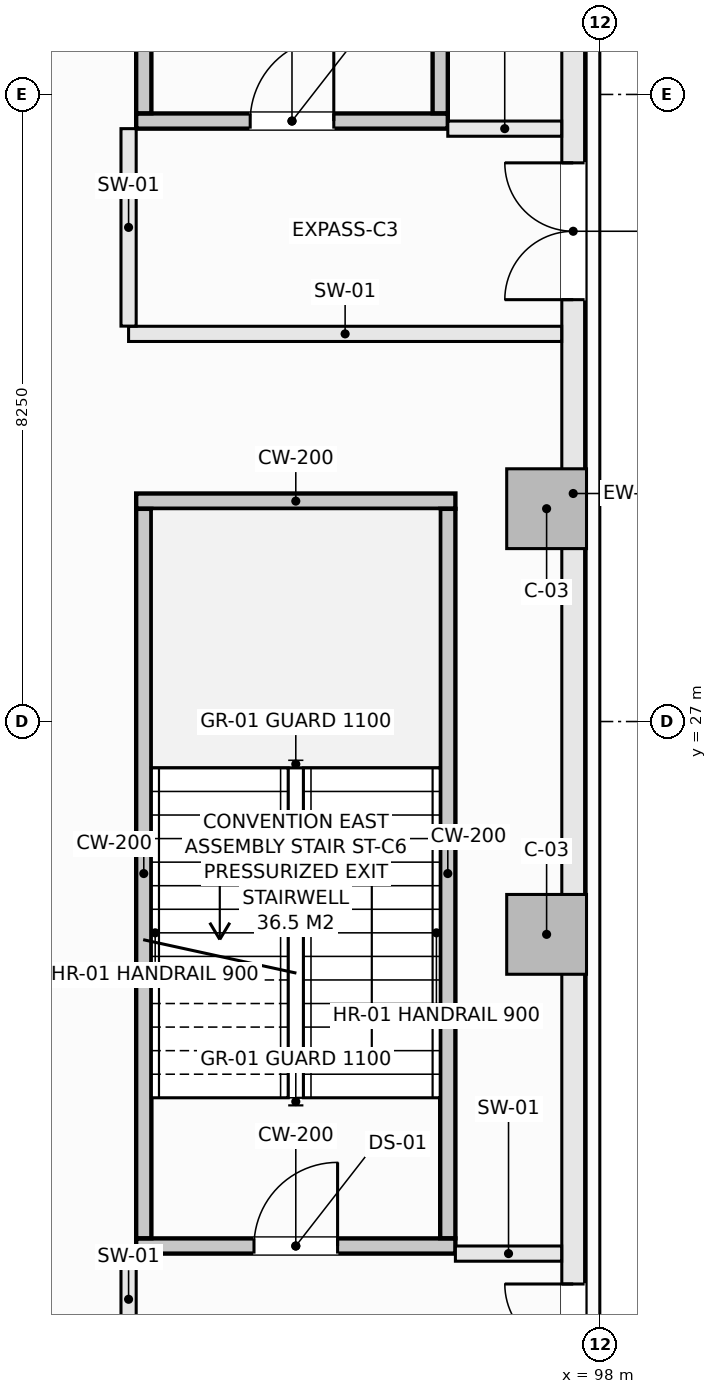
"""IFC4 building model, lengths in metres.
Left out: names, types, materials, properties, quantities, classifications, styles, units other than length and angle.
Written with IfcOpenShell. Run it as: python <this file> out.ifc"""

import sys

from ifc_helpers import new_model, si_unit, direction, frame, frame_2d, origin, origin_2d, place, context, subcontext, project, spatial, rectangle, extrude, element, fill, save


model = new_model("IFC4")
c1 = context("Model", 3, precision=1e-05, world=origin(), true_north=direction((0.0, 1.0)))
c2 = subcontext(c1, "Body", "Model", "MODEL_VIEW")
j1 = project(units=[si_unit("LENGTHUNIT", "METRE"), si_unit("PLANEANGLEUNIT", "RADIAN")], contexts=[c1])
p1 = place(None, origin())
s1 = spatial("IfcSite", under=j1, at=p1, CompositionType="ELEMENT")
p2 = place(p1, origin())
s2 = spatial("IfcBuilding", under=s1, at=p2, CompositionType="ELEMENT")
p3 = place(p2, origin())
s3 = spatial("IfcBuildingStorey", under=s2, at=p3, CompositionType="ELEMENT", Elevation=0.0)
for number, where, z_axis, x_axis in (
    (1, (97.3, 24.2, -0.36), (0.0, 0.0, 1.0), (1.0, 0.0, 0.0)),
    (2, (97.3, 29.8, -0.36), (0.0, 0.0, 1.0), (1.0, 0.0, 0.0)),
):
    element("IfcColumn", number, at=place(p3, frame(where, z_axis=z_axis, x_axis=x_axis)), inside=s3, PredefinedType="COLUMN", context=c2, shape_type="SweptSolid", body=[
        extrude(rectangle(XDim=1.05, YDim=1.05, at=origin_2d()), origin(), (0.0, 0.0, 1.0), 5.1),
    ])
p4 = place(p3, frame((97.65, 2.35, 0.0), z_axis=(0.0, 0.0, 1.0), x_axis=(0.0, 1.0, 0.0)))
e3 = element("IfcWall", 3, at=p4, inside=s3, PredefinedType="SOLIDWALL", context=c2, shape_type="SweptSolid", body=[
    extrude(rectangle(XDim=49.3, YDim=0.3, at=frame_2d((24.65, 0.0))), origin(), (0.0, 0.0, 1.0), 4.74),
])
p5 = place(p4, frame((15.45, 0.0, 0.0)))
e4 = element("IfcOpeningElement", 4, at=p5, cuts=e3, PredefinedType="OPENING", context=c2, shape_type="SweptSolid", body=[
    extrude(rectangle(XDim=1.8, YDim=2.3, at=frame_2d((0.9, 1.15))), frame((0.0, 0.16, 0.0), z_axis=(0.0, -1.0, 0.0), x_axis=(1.0, 0.0, 0.0)), (0.0, 0.0, 1.0), 0.32),
])
p6 = place(p4, frame((30.2, 0.0, 0.0)))
e5 = element("IfcOpeningElement", 5, at=p6, cuts=e3, PredefinedType="OPENING", context=c2, shape_type="SweptSolid", body=[
    extrude(rectangle(XDim=1.8, YDim=2.3, at=frame_2d((0.9, 1.15))), frame((0.0, 0.16, 0.0), z_axis=(0.0, -1.0, 0.0), x_axis=(1.0, 0.0, 0.0)), (0.0, 0.0, 1.0), 0.32),
])
p7 = place(p3, frame((91.9, 34.9, -0.36), z_axis=(0.0, 0.0, 1.0), x_axis=(1.0, 0.0, 0.0)))
e6 = element("IfcWall", 6, at=p7, inside=s3, PredefinedType="SHEAR", context=c2, shape_type="SweptSolid", body=[
    extrude(rectangle(XDim=4.1, YDim=0.2, at=frame_2d((2.05, 0.0))), origin(), (0.0, 0.0, 1.0), 5.1),
])
p8 = place(p7, frame((1.5, 0.0, 0.36)))
e7 = element("IfcOpeningElement", 7, at=p8, cuts=e6, PredefinedType="OPENING", context=c2, shape_type="SweptSolid", body=[
    extrude(rectangle(XDim=1.1, YDim=2.15, at=frame_2d((0.55, 1.075))), frame((0.0, 0.11, 0.0), z_axis=(0.0, -1.0, 0.0), x_axis=(1.0, 0.0, 0.0)), (0.0, 0.0, 1.0), 0.22),
])
for number, where, z_axis, x_axis in (
    (8, (92.0, 35.002, -0.36), (0.0, 0.0, 1.0), (0.0, 1.0, 0.0)),
    (9, (95.9, 35.002, -0.36), (0.0, 0.0, 1.0), (0.0, 1.0, 0.0)),
):
    element("IfcWall", number, at=place(p3, frame(where, z_axis=z_axis, x_axis=x_axis)), inside=s3, PredefinedType="SHEAR", context=c2, shape_type="SweptSolid", body=[
        extrude(rectangle(XDim=9.596, YDim=0.2, at=frame_2d((4.798, 0.0))), origin(), (0.0, 0.0, 1.0), 5.1),
    ])
p9 = place(p3, frame((91.9, 20.1, -0.36), z_axis=(0.0, 0.0, 1.0), x_axis=(1.0, 0.0, 0.0)))
e10 = element("IfcWall", 10, at=p9, inside=s3, PredefinedType="SHEAR", context=c2, shape_type="SweptSolid", body=[
    extrude(rectangle(XDim=4.2, YDim=0.2, at=frame_2d((2.1, 0.0))), origin(), (0.0, 0.0, 1.0), 5.1),
])
p10 = place(p9, frame((1.55, 0.0, 0.36)))
e11 = element("IfcOpeningElement", 11, at=p10, cuts=e10, PredefinedType="OPENING", context=c2, shape_type="SweptSolid", body=[
    extrude(rectangle(XDim=1.1, YDim=2.15, at=frame_2d((0.55, 1.075))), frame((0.0, 0.11, 0.0), z_axis=(0.0, -1.0, 0.0), x_axis=(1.0, 0.0, 0.0)), (0.0, 0.0, 1.0), 0.22),
])
p11 = place(p3, frame((91.9, 29.9, -0.36), z_axis=(0.0, 0.0, 1.0), x_axis=(1.0, 0.0, 0.0)))
e12 = element("IfcWall", 12, at=p11, inside=s3, PredefinedType="SHEAR", context=c2, shape_type="SweptSolid", body=[
    extrude(rectangle(XDim=4.2, YDim=0.2, at=frame_2d((2.1, 0.0))), origin(), (0.0, 0.0, 1.0), 5.1),
])
for number, where, z_axis, x_axis in (
    (13, (92.0, 20.202, -0.36), (0.0, 0.0, 1.0), (0.0, 1.0, 0.0)),
    (14, (96.0, 20.202, -0.36), (0.0, 0.0, 1.0), (0.0, 1.0, 0.0)),
):
    element("IfcWall", number, at=place(p3, frame(where, z_axis=z_axis, x_axis=x_axis)), inside=s3, PredefinedType="SHEAR", context=c2, shape_type="SweptSolid", body=[
        extrude(rectangle(XDim=9.596, YDim=0.2, at=frame_2d((4.798, 0.0))), origin(), (0.0, 0.0, 1.0), 5.1),
    ])
p12 = place(p3, frame((91.8, 32.1, 0.0), z_axis=(0.0, 0.0, 1.0), x_axis=(1.0, 0.0, 0.0)))
e15 = element("IfcWall", 15, at=p12, inside=s3, PredefinedType="SOLIDWALL", context=c2, shape_type="SweptSolid", body=[
    extrude(rectangle(XDim=5.698, YDim=0.2, at=frame_2d((2.849, 0.0))), origin(), (0.0, 0.0, 1.0), 4.74),
])
p13 = place(p3, frame((96.0, 34.8, 0.0), z_axis=(0.0, 0.0, 1.0), x_axis=(1.0, 0.0, 0.0)))
e16 = element("IfcWall", 16, at=p13, inside=s3, PredefinedType="SOLIDWALL", context=c2, shape_type="SweptSolid", body=[
    extrude(rectangle(XDim=1.498, YDim=0.2, at=frame_2d((0.749, 0.0))), origin(), (0.0, 0.0, 1.0), 4.375),
])
p14 = place(p3, frame((91.8, 18.798, 0.0), z_axis=(0.0, 0.0, 1.0), x_axis=(0.0, 1.0, 0.0)))
e17 = element("IfcWall", 17, at=p14, inside=s3, PredefinedType="SOLIDWALL", context=c2, shape_type="SweptSolid", body=[
    extrude(rectangle(XDim=1.202, YDim=0.2, at=frame_2d((0.601, 0.0))), origin(), (0.0, 0.0, 1.0), 4.74),
])
p15 = place(p3, frame((91.8, 32.202, 0.0), z_axis=(0.0, 0.0, 1.0), x_axis=(0.0, 1.0, 0.0)))
e18 = element("IfcWall", 18, at=p15, inside=s3, PredefinedType="SOLIDWALL", context=c2, shape_type="SweptSolid", body=[
    extrude(rectangle(XDim=2.598, YDim=0.2, at=frame_2d((1.299, 0.0))), origin(), (0.0, 0.0, 1.0), 4.74),
])
p16 = place(p3, frame((96.1, 20.0, 0.0), z_axis=(0.0, 0.0, 1.0), x_axis=(1.0, 0.0, 0.0)))
e19 = element("IfcWall", 19, at=p16, inside=s3, PredefinedType="SOLIDWALL", context=c2, shape_type="SweptSolid", body=[
    extrude(rectangle(XDim=1.398, YDim=0.2, at=frame_2d((0.699, 0.0))), origin(), (0.0, 0.0, 1.0), 4.74),
])
p17 = place(p5, frame((1.8, 0.0, 0.0), z_axis=(0.0, 0.0, 1.0), x_axis=(-1.0, 0.0, 0.0)))
e20 = element("IfcDoor", 20, at=p17, inside=s3, OperationType="DOUBLE_DOOR_SINGLE_SWING", PredefinedType="DOOR", context=c2, shape_type="SweptSolid", body=[
    extrude(rectangle(XDim=1.8, YDim=2.3, at=frame_2d((0.9, 1.15))), frame((0.0, 0.025, 0.0), z_axis=(0.0, -1.0, 0.0), x_axis=(1.0, 0.0, 0.0)), (0.0, 0.0, 1.0), 0.05),
])
fill(e4, e20)
p18 = place(p6, frame((1.8, 0.0, 0.0), z_axis=(0.0, 0.0, 1.0), x_axis=(-1.0, 0.0, 0.0)))
e21 = element("IfcDoor", 21, at=p18, inside=s3, OperationType="DOUBLE_DOOR_SINGLE_SWING", PredefinedType="DOOR", context=c2, shape_type="SweptSolid", body=[
    extrude(rectangle(XDim=1.8, YDim=2.3, at=frame_2d((0.9, 1.15))), frame((0.0, 0.025, 0.0), z_axis=(0.0, -1.0, 0.0), x_axis=(1.0, 0.0, 0.0)), (0.0, 0.0, 1.0), 0.05),
])
fill(e5, e21)
p19 = place(p8, origin())
e22 = element("IfcDoor", 22, at=p19, inside=s3, OperationType="SINGLE_SWING_RIGHT", PredefinedType="DOOR", context=c2, shape_type="SweptSolid", body=[
    extrude(rectangle(XDim=1.1, YDim=2.15, at=frame_2d((0.55, 1.075))), frame((0.0, 0.025, 0.0), z_axis=(0.0, -1.0, 0.0), x_axis=(1.0, 0.0, 0.0)), (0.0, 0.0, 1.0), 0.05),
])
fill(e7, e22)
p20 = place(p10, origin())
e23 = element("IfcDoor", 23, at=p20, inside=s3, OperationType="SINGLE_SWING_RIGHT", PredefinedType="DOOR", context=c2, shape_type="SweptSolid", body=[
    extrude(rectangle(XDim=1.1, YDim=2.15, at=frame_2d((0.55, 1.075))), frame((0.0, 0.025, 0.0), z_axis=(0.0, -1.0, 0.0), x_axis=(1.0, 0.0, 0.0)), (0.0, 0.0, 1.0), 0.05),
])
fill(e11, e23)
save(model, sys.argv[1])
